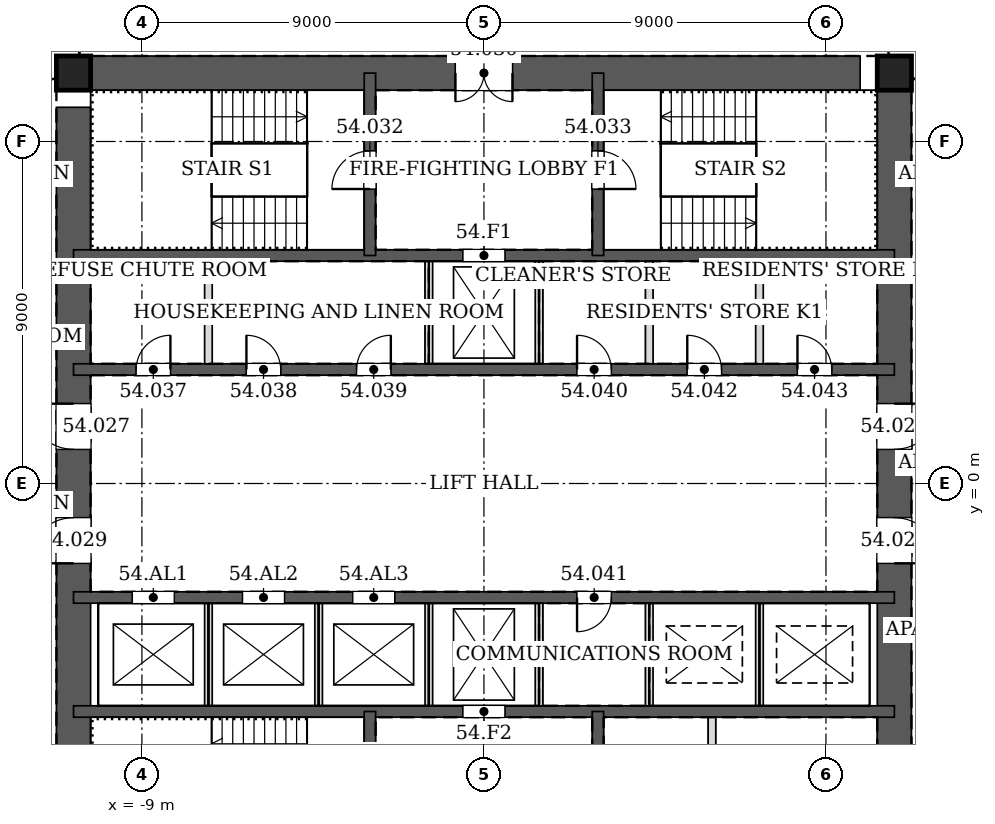
"""IFC4 building model, lengths in metres.
Left out: names, types, materials, properties, quantities, classifications, styles, units other than length and angle.
Written with IfcOpenShell. Run it as: python <this file> out.ifc"""

import sys

from ifc_helpers import new_model, si_unit, direction, frame, frame_2d, origin, origin_2d, place, context, subcontext, project, spatial, rectangle, hollow_rectangle, extrude, element, fill, save


model = new_model("IFC4")
c1 = context("Model", 3, precision=1e-05, world=origin(), true_north=direction((0.0, 1.0)))
c2 = subcontext(c1, "Body", "Model", "MODEL_VIEW")
j1 = project(units=[si_unit("LENGTHUNIT", "METRE"), si_unit("PLANEANGLEUNIT", "RADIAN")], contexts=[c1])
p1 = place(None, origin())
s1 = spatial("IfcSite", under=j1, at=p1, CompositionType="ELEMENT")
p2 = place(p1, origin())
s2 = spatial("IfcBuilding", under=s1, at=p2, CompositionType="ELEMENT")
p3 = place(p2, frame((0.0, 0.0, 231.2)))
s3 = spatial("IfcBuildingStorey", under=s2, at=p3, CompositionType="ELEMENT", Elevation=231.2)
for number, where, z_axis, x_axis in (
    (1, (10.8, 10.8, 0.0), (0.0, 0.0, 1.0), (1.0, 0.0, 0.0)),
    (2, (-10.8, 10.8, 0.0), (0.0, 0.0, 1.0), (1.0, 0.0, 0.0)),
):
    element("IfcColumn", number, at=place(p3, frame(where, z_axis=z_axis, x_axis=x_axis)), inside=s3, PredefinedType="COLUMN", context=c2, shape_type="SweptSolid", body=[
        extrude(hollow_rectangle(XDim=0.9, YDim=0.9, WallThickness=0.05, at=origin_2d()), origin(), (0.0, 0.0, 1.0), 3.4),
    ])
p4 = place(p3, frame((10.8, -10.8, 0.0), z_axis=(0.0, 0.0, 1.0), x_axis=(0.0, 1.0, 0.0)))
e3 = element("IfcWall", 3, at=p4, inside=s3, PredefinedType="SOLIDWALL", context=c2, shape_type="SweptSolid", body=[
    extrude(rectangle(XDim=21.6, YDim=0.9, at=frame_2d((10.8, 0.0))), origin(), (0.0, 0.0, 1.0), 3.4),
])
p5 = place(p4, frame((11.7, 0.0, 0.0)))
e4 = element("IfcOpeningElement", 4, at=p5, cuts=e3, PredefinedType="OPENING", context=c2, shape_type="SweptSolid", body=[
    extrude(rectangle(XDim=1.2, YDim=2.1, at=frame_2d((0.6, 1.05))), frame((0.0, 0.46, 0.0), z_axis=(0.0, -1.0, 0.0), x_axis=(1.0, 0.0, 0.0)), (0.0, 0.0, 1.0), 0.92),
])
p6 = place(p4, frame((8.7, 0.0, 0.0)))
e5 = element("IfcOpeningElement", 5, at=p6, cuts=e3, PredefinedType="OPENING", context=c2, shape_type="SweptSolid", body=[
    extrude(rectangle(XDim=1.2, YDim=2.1, at=frame_2d((0.6, 1.05))), frame((0.0, 0.46, 0.0), z_axis=(0.0, -1.0, 0.0), x_axis=(1.0, 0.0, 0.0)), (0.0, 0.0, 1.0), 0.92),
])
p7 = place(p3, frame((10.8, 10.8, 0.0), z_axis=(0.0, 0.0, 1.0), x_axis=(-1.0, 0.0, 0.0)))
e6 = element("IfcWall", 6, at=p7, inside=s3, PredefinedType="SOLIDWALL", context=c2, shape_type="SweptSolid", body=[
    extrude(rectangle(XDim=21.6, YDim=0.9, at=frame_2d((10.8, 0.0))), origin(), (0.0, 0.0, 1.0), 3.4),
])
p8 = place(p7, frame((10.05, 0.0, 0.0)))
e7 = element("IfcOpeningElement", 7, at=p8, cuts=e6, PredefinedType="OPENING", context=c2, shape_type="SweptSolid", body=[
    extrude(rectangle(XDim=1.5, YDim=2.1, at=frame_2d((0.75, 1.05))), frame((0.0, 0.46, 0.0), z_axis=(0.0, -1.0, 0.0), x_axis=(1.0, 0.0, 0.0)), (0.0, 0.0, 1.0), 0.92),
])
p9 = place(p3, frame((-10.8, 10.8, 0.0), z_axis=(0.0, 0.0, 1.0), x_axis=(0.0, -1.0, 0.0)))
e8 = element("IfcWall", 8, at=p9, inside=s3, PredefinedType="SOLIDWALL", context=c2, shape_type="SweptSolid", body=[
    extrude(rectangle(XDim=21.6, YDim=0.9, at=frame_2d((10.8, 0.0))), origin(), (0.0, 0.0, 1.0), 3.4),
])
p10 = place(p9, frame((8.7, 0.0, 0.0)))
e9 = element("IfcOpeningElement", 9, at=p10, cuts=e8, PredefinedType="OPENING", context=c2, shape_type="SweptSolid", body=[
    extrude(rectangle(XDim=1.2, YDim=2.1, at=frame_2d((0.6, 1.05))), frame((0.0, 0.46, 0.0), z_axis=(0.0, -1.0, 0.0), x_axis=(1.0, 0.0, 0.0)), (0.0, 0.0, 1.0), 0.92),
])
p11 = place(p9, frame((11.7, 0.0, 0.0)))
e10 = element("IfcOpeningElement", 10, at=p11, cuts=e8, PredefinedType="OPENING", context=c2, shape_type="SweptSolid", body=[
    extrude(rectangle(XDim=1.2, YDim=2.1, at=frame_2d((0.6, 1.05))), frame((0.0, 0.46, 0.0), z_axis=(0.0, -1.0, 0.0), x_axis=(1.0, 0.0, 0.0)), (0.0, 0.0, 1.0), 0.92),
])
p12 = place(p3, frame((-10.8, 3.0, 0.0), z_axis=(0.0, 0.0, 1.0), x_axis=(1.0, 0.0, 0.0)))
e11 = element("IfcWall", 11, at=p12, inside=s3, PredefinedType="SOLIDWALL", context=c2, shape_type="SweptSolid", body=[
    extrude(rectangle(XDim=21.6, YDim=0.3, at=frame_2d((10.8, 0.0))), origin(), (0.0, 0.0, 1.0), 3.4),
])
p13 = place(p12, frame((1.65, 0.0, 0.0)))
e12 = element("IfcOpeningElement", 12, at=p13, cuts=e11, PredefinedType="OPENING", context=c2, shape_type="SweptSolid", body=[
    extrude(rectangle(XDim=0.9, YDim=2.1, at=frame_2d((0.45, 1.05))), frame((0.0, 0.16, 0.0), z_axis=(0.0, -1.0, 0.0), x_axis=(1.0, 0.0, 0.0)), (0.0, 0.0, 1.0), 0.32),
])
p14 = place(p12, frame((4.55, 0.0, 0.0)))
e13 = element("IfcOpeningElement", 13, at=p14, cuts=e11, PredefinedType="OPENING", context=c2, shape_type="SweptSolid", body=[
    extrude(rectangle(XDim=0.9, YDim=2.1, at=frame_2d((0.45, 1.05))), frame((0.0, 0.16, 0.0), z_axis=(0.0, -1.0, 0.0), x_axis=(1.0, 0.0, 0.0)), (0.0, 0.0, 1.0), 0.32),
])
p15 = place(p12, frame((7.45, 0.0, 0.0)))
e14 = element("IfcOpeningElement", 14, at=p15, cuts=e11, PredefinedType="OPENING", context=c2, shape_type="SweptSolid", body=[
    extrude(rectangle(XDim=0.9, YDim=2.1, at=frame_2d((0.45, 1.05))), frame((0.0, 0.16, 0.0), z_axis=(0.0, -1.0, 0.0), x_axis=(1.0, 0.0, 0.0)), (0.0, 0.0, 1.0), 0.32),
])
p16 = place(p12, frame((13.25, 0.0, 0.0)))
e15 = element("IfcOpeningElement", 15, at=p16, cuts=e11, PredefinedType="OPENING", context=c2, shape_type="SweptSolid", body=[
    extrude(rectangle(XDim=0.9, YDim=2.1, at=frame_2d((0.45, 1.05))), frame((0.0, 0.16, 0.0), z_axis=(0.0, -1.0, 0.0), x_axis=(1.0, 0.0, 0.0)), (0.0, 0.0, 1.0), 0.32),
])
p17 = place(p12, frame((16.15, 0.0, 0.0)))
e16 = element("IfcOpeningElement", 16, at=p17, cuts=e11, PredefinedType="OPENING", context=c2, shape_type="SweptSolid", body=[
    extrude(rectangle(XDim=0.9, YDim=2.1, at=frame_2d((0.45, 1.05))), frame((0.0, 0.16, 0.0), z_axis=(0.0, -1.0, 0.0), x_axis=(1.0, 0.0, 0.0)), (0.0, 0.0, 1.0), 0.32),
])
p18 = place(p12, frame((19.05, 0.0, 0.0)))
e17 = element("IfcOpeningElement", 17, at=p18, cuts=e11, PredefinedType="OPENING", context=c2, shape_type="SweptSolid", body=[
    extrude(rectangle(XDim=0.9, YDim=2.1, at=frame_2d((0.45, 1.05))), frame((0.0, 0.16, 0.0), z_axis=(0.0, -1.0, 0.0), x_axis=(1.0, 0.0, 0.0)), (0.0, 0.0, 1.0), 0.32),
])
p19 = place(p3, frame((-10.8, 6.0, 0.0), z_axis=(0.0, 0.0, 1.0), x_axis=(1.0, 0.0, 0.0)))
e18 = element("IfcWall", 18, at=p19, inside=s3, PredefinedType="SOLIDWALL", context=c2, shape_type="SweptSolid", body=[
    extrude(rectangle(XDim=21.6, YDim=0.3, at=frame_2d((10.8, 0.0))), origin(), (0.0, 0.0, 1.0), 3.4),
])
p20 = place(p19, frame((10.25, 0.0, 0.0)))
e19 = element("IfcOpeningElement", 19, at=p20, cuts=e18, PredefinedType="OPENING", context=c2, shape_type="SweptSolid", body=[
    extrude(rectangle(XDim=1.1, YDim=2.1, at=frame_2d((0.55, 1.05))), frame((0.0, 0.16, 0.0), z_axis=(0.0, -1.0, 0.0), x_axis=(1.0, 0.0, 0.0)), (0.0, 0.0, 1.0), 0.32),
])
p21 = place(p3, frame((-3.0, 6.0, 0.0), z_axis=(0.0, 0.0, 1.0), x_axis=(0.0, 1.0, 0.0)))
e20 = element("IfcWall", 20, at=p21, inside=s3, PredefinedType="SOLIDWALL", context=c2, shape_type="SweptSolid", body=[
    extrude(rectangle(XDim=4.8, YDim=0.3, at=frame_2d((2.4, 0.0))), origin(), (0.0, 0.0, 1.0), 3.4),
])
p22 = place(p21, frame((1.75, 0.0, 0.0)))
e21 = element("IfcOpeningElement", 21, at=p22, cuts=e20, PredefinedType="OPENING", context=c2, shape_type="SweptSolid", body=[
    extrude(rectangle(XDim=1.0, YDim=2.1, at=frame_2d((0.5, 1.05))), frame((0.0, 0.16, 0.0), z_axis=(0.0, -1.0, 0.0), x_axis=(1.0, 0.0, 0.0)), (0.0, 0.0, 1.0), 0.32),
])
p23 = place(p3, frame((3.0, 6.0, 0.0), z_axis=(0.0, 0.0, 1.0), x_axis=(0.0, 1.0, 0.0)))
e22 = element("IfcWall", 22, at=p23, inside=s3, PredefinedType="SOLIDWALL", context=c2, shape_type="SweptSolid", body=[
    extrude(rectangle(XDim=4.8, YDim=0.3, at=frame_2d((2.4, 0.0))), origin(), (0.0, 0.0, 1.0), 3.4),
])
p24 = place(p23, frame((1.75, 0.0, 0.0)))
e23 = element("IfcOpeningElement", 23, at=p24, cuts=e22, PredefinedType="OPENING", context=c2, shape_type="SweptSolid", body=[
    extrude(rectangle(XDim=1.0, YDim=2.1, at=frame_2d((0.5, 1.05))), frame((0.0, 0.16, 0.0), z_axis=(0.0, -1.0, 0.0), x_axis=(1.0, 0.0, 0.0)), (0.0, 0.0, 1.0), 0.32),
])
p25 = place(p3, frame((-10.8, -3.0, 0.0), z_axis=(0.0, 0.0, 1.0), x_axis=(1.0, 0.0, 0.0)))
e24 = element("IfcWall", 24, at=p25, inside=s3, PredefinedType="SOLIDWALL", context=c2, shape_type="SweptSolid", body=[
    extrude(rectangle(XDim=21.6, YDim=0.3, at=frame_2d((10.8, 0.0))), origin(), (0.0, 0.0, 1.0), 3.4),
])
p26 = place(p25, frame((13.25, 0.0, 0.0)))
e25 = element("IfcOpeningElement", 25, at=p26, cuts=e24, PredefinedType="OPENING", context=c2, shape_type="SweptSolid", body=[
    extrude(rectangle(XDim=0.9, YDim=2.1, at=frame_2d((0.45, 1.05))), frame((0.0, 0.16, 0.0), z_axis=(0.0, -1.0, 0.0), x_axis=(1.0, 0.0, 0.0)), (0.0, 0.0, 1.0), 0.32),
])
p27 = place(p25, frame((1.55, 0.0, 0.0)))
e26 = element("IfcOpeningElement", 26, at=p27, cuts=e24, PredefinedType="OPENING", context=c2, shape_type="SweptSolid", body=[
    extrude(rectangle(XDim=1.1, YDim=2.1, at=frame_2d((0.55, 1.05))), frame((0.0, 0.16, 0.0), z_axis=(0.0, -1.0, 0.0), x_axis=(1.0, 0.0, 0.0)), (0.0, 0.0, 1.0), 0.32),
])
p28 = place(p25, frame((4.45, 0.0, 0.0)))
e27 = element("IfcOpeningElement", 27, at=p28, cuts=e24, PredefinedType="OPENING", context=c2, shape_type="SweptSolid", body=[
    extrude(rectangle(XDim=1.1, YDim=2.1, at=frame_2d((0.55, 1.05))), frame((0.0, 0.16, 0.0), z_axis=(0.0, -1.0, 0.0), x_axis=(1.0, 0.0, 0.0)), (0.0, 0.0, 1.0), 0.32),
])
p29 = place(p25, frame((7.35, 0.0, 0.0)))
e28 = element("IfcOpeningElement", 28, at=p29, cuts=e24, PredefinedType="OPENING", context=c2, shape_type="SweptSolid", body=[
    extrude(rectangle(XDim=1.1, YDim=2.1, at=frame_2d((0.55, 1.05))), frame((0.0, 0.16, 0.0), z_axis=(0.0, -1.0, 0.0), x_axis=(1.0, 0.0, 0.0)), (0.0, 0.0, 1.0), 0.32),
])
p30 = place(p3, frame((-10.8, -6.0, 0.0), z_axis=(0.0, 0.0, 1.0), x_axis=(1.0, 0.0, 0.0)))
e29 = element("IfcWall", 29, at=p30, inside=s3, PredefinedType="SOLIDWALL", context=c2, shape_type="SweptSolid", body=[
    extrude(rectangle(XDim=21.6, YDim=0.3, at=frame_2d((10.8, 0.0))), origin(), (0.0, 0.0, 1.0), 3.4),
])
p31 = place(p30, frame((10.25, 0.0, 0.0)))
e30 = element("IfcOpeningElement", 30, at=p31, cuts=e29, PredefinedType="OPENING", context=c2, shape_type="SweptSolid", body=[
    extrude(rectangle(XDim=1.1, YDim=2.1, at=frame_2d((0.55, 1.05))), frame((0.0, 0.16, 0.0), z_axis=(0.0, -1.0, 0.0), x_axis=(1.0, 0.0, 0.0)), (0.0, 0.0, 1.0), 0.32),
])
p32 = place(p3, frame((-3.0, -6.0, 0.0), z_axis=(0.0, 0.0, 1.0), x_axis=(0.0, -1.0, 0.0)))
e31 = element("IfcWall", 31, at=p32, inside=s3, PredefinedType="SOLIDWALL", context=c2, shape_type="SweptSolid", body=[
    extrude(rectangle(XDim=4.8, YDim=0.3, at=frame_2d((2.4, 0.0))), origin(), (0.0, 0.0, 1.0), 3.4),
])
p33 = place(p32, frame((1.75, 0.0, 0.0)))
e32 = element("IfcOpeningElement", 32, at=p33, cuts=e31, PredefinedType="OPENING", context=c2, shape_type="SweptSolid", body=[
    extrude(rectangle(XDim=1.0, YDim=2.1, at=frame_2d((0.5, 1.05))), frame((0.0, 0.16, 0.0), z_axis=(0.0, -1.0, 0.0), x_axis=(1.0, 0.0, 0.0)), (0.0, 0.0, 1.0), 0.32),
])
p34 = place(p3, frame((3.0, -6.0, 0.0), z_axis=(0.0, 0.0, 1.0), x_axis=(0.0, -1.0, 0.0)))
e33 = element("IfcWall", 33, at=p34, inside=s3, PredefinedType="SOLIDWALL", context=c2, shape_type="SweptSolid", body=[
    extrude(rectangle(XDim=4.8, YDim=0.3, at=frame_2d((2.4, 0.0))), origin(), (0.0, 0.0, 1.0), 3.4),
])
for number, where, z_axis, x_axis in (
    (34, (-7.25, 3.15, 0.0), (0.0, 0.0, 1.0), (0.0, 1.0, 0.0)),
    (35, (-1.45, 3.15, 0.0), (0.0, 0.0, 1.0), (0.0, 1.0, 0.0)),
    (36, (1.45, 3.15, 0.0), (0.0, 0.0, 1.0), (0.0, 1.0, 0.0)),
    (37, (4.35, 3.15, 0.0), (0.0, 0.0, 1.0), (0.0, 1.0, 0.0)),
    (38, (7.25, 3.15, 0.0), (0.0, 0.0, 1.0), (0.0, 1.0, 0.0)),
):
    element("IfcWall", number, at=place(p3, frame(where, z_axis=z_axis, x_axis=x_axis)), inside=s3, PredefinedType="PARTITIONING", context=c2, shape_type="SweptSolid", body=[
        extrude(rectangle(XDim=2.7, YDim=0.2, at=frame_2d((1.35, 0.0))), origin(), (0.0, 0.0, 1.0), 3.2),
    ])
for number, where, z_axis, x_axis in (
    (39, (-7.25, -5.85, 0.0), (0.0, 0.0, 1.0), (0.0, 1.0, 0.0)),
    (40, (-4.35, -5.85, 0.0), (0.0, 0.0, 1.0), (0.0, 1.0, 0.0)),
    (41, (-1.45, -5.85, 0.0), (0.0, 0.0, 1.0), (0.0, 1.0, 0.0)),
):
    element("IfcWall", number, at=place(p3, frame(where, z_axis=z_axis, x_axis=x_axis)), inside=s3, PredefinedType="PARTITIONING", context=c2, shape_type="SweptSolid", body=[
        extrude(rectangle(XDim=2.7, YDim=0.2, at=frame_2d((1.35, 0.0))), origin(), (0.0, 0.0, 1.0), 3.4),
    ])
for number, where, z_axis, x_axis in (
    (42, (1.45, -5.85, 0.0), (0.0, 0.0, 1.0), (0.0, 1.0, 0.0)),
    (43, (4.35, -5.85, 0.0), (0.0, 0.0, 1.0), (0.0, 1.0, 0.0)),
):
    element("IfcWall", number, at=place(p3, frame(where, z_axis=z_axis, x_axis=x_axis)), inside=s3, PredefinedType="PARTITIONING", context=c2, shape_type="SweptSolid", body=[
        extrude(rectangle(XDim=2.7, YDim=0.2, at=frame_2d((1.35, 0.0))), origin(), (0.0, 0.0, 1.0), 3.2),
    ])
p35 = place(p3, frame((7.25, -5.85, 0.0), z_axis=(0.0, 0.0, 1.0), x_axis=(0.0, 1.0, 0.0)))
e44 = element("IfcWall", 44, at=p35, inside=s3, PredefinedType="PARTITIONING", context=c2, shape_type="SweptSolid", body=[
    extrude(rectangle(XDim=2.7, YDim=0.2, at=frame_2d((1.35, 0.0))), origin(), (0.0, 0.0, 1.0), 3.4),
])
p36 = place(p3, frame((6.0, -10.35, 0.0), z_axis=(0.0, 0.0, 1.0), x_axis=(0.0, 1.0, 0.0)))
e45 = element("IfcWall", 45, at=p36, inside=s3, PredefinedType="PARTITIONING", context=c2, shape_type="SweptSolid", body=[
    extrude(rectangle(XDim=4.2, YDim=0.2, at=frame_2d((2.1, 0.0))), origin(), (0.0, 0.0, 1.0), 3.2),
])
p37 = place(p36, frame((0.3, 0.0, 0.0)))
e46 = element("IfcOpeningElement", 46, at=p37, cuts=e45, PredefinedType="OPENING", context=c2, shape_type="SweptSolid", body=[
    extrude(rectangle(XDim=0.9, YDim=2.1, at=frame_2d((0.45, 1.05))), frame((0.0, 0.11, 0.0), z_axis=(0.0, -1.0, 0.0), x_axis=(1.0, 0.0, 0.0)), (0.0, 0.0, 1.0), 0.22),
])
p38 = place(p5, frame((1.2, 0.0, 0.0), z_axis=(0.0, 0.0, 1.0), x_axis=(-1.0, 0.0, 0.0)))
e47 = element("IfcDoor", 47, at=p38, inside=s3, OperationType="SINGLE_SWING_LEFT", PredefinedType="DOOR", context=c2, shape_type="SweptSolid", body=[
    extrude(rectangle(XDim=1.2, YDim=2.1, at=frame_2d((0.6, 1.05))), frame((0.0, 0.025, 0.0), z_axis=(0.0, -1.0, 0.0), x_axis=(1.0, 0.0, 0.0)), (0.0, 0.0, 1.0), 0.05),
])
fill(e4, e47)
p39 = place(p10, frame((1.2, 0.0, 0.0), z_axis=(0.0, 0.0, 1.0), x_axis=(-1.0, 0.0, 0.0)))
e48 = element("IfcDoor", 48, at=p39, inside=s3, OperationType="SINGLE_SWING_RIGHT", PredefinedType="DOOR", context=c2, shape_type="SweptSolid", body=[
    extrude(rectangle(XDim=1.2, YDim=2.1, at=frame_2d((0.6, 1.05))), frame((0.0, 0.025, 0.0), z_axis=(0.0, -1.0, 0.0), x_axis=(1.0, 0.0, 0.0)), (0.0, 0.0, 1.0), 0.05),
])
fill(e9, e48)
p40 = place(p6, frame((1.2, 0.0, 0.0), z_axis=(0.0, 0.0, 1.0), x_axis=(-1.0, 0.0, 0.0)))
e49 = element("IfcDoor", 49, at=p40, inside=s3, OperationType="SINGLE_SWING_RIGHT", PredefinedType="DOOR", context=c2, shape_type="SweptSolid", body=[
    extrude(rectangle(XDim=1.2, YDim=2.1, at=frame_2d((0.6, 1.05))), frame((0.0, 0.025, 0.0), z_axis=(0.0, -1.0, 0.0), x_axis=(1.0, 0.0, 0.0)), (0.0, 0.0, 1.0), 0.05),
])
fill(e5, e49)
p41 = place(p11, frame((1.2, 0.0, 0.0), z_axis=(0.0, 0.0, 1.0), x_axis=(-1.0, 0.0, 0.0)))
e50 = element("IfcDoor", 50, at=p41, inside=s3, OperationType="SINGLE_SWING_LEFT", PredefinedType="DOOR", context=c2, shape_type="SweptSolid", body=[
    extrude(rectangle(XDim=1.2, YDim=2.1, at=frame_2d((0.6, 1.05))), frame((0.0, 0.025, 0.0), z_axis=(0.0, -1.0, 0.0), x_axis=(1.0, 0.0, 0.0)), (0.0, 0.0, 1.0), 0.05),
])
fill(e10, e50)
p42 = place(p8, origin())
e51 = element("IfcDoor", 51, at=p42, inside=s3, OperationType="DOUBLE_DOOR_SINGLE_SWING", PredefinedType="DOOR", context=c2, shape_type="SweptSolid", body=[
    extrude(rectangle(XDim=1.5, YDim=2.1, at=frame_2d((0.75, 1.05))), frame((0.0, 0.025, 0.0), z_axis=(0.0, -1.0, 0.0), x_axis=(1.0, 0.0, 0.0)), (0.0, 0.0, 1.0), 0.05),
])
fill(e7, e51)
p43 = place(p22, origin())
e52 = element("IfcDoor", 52, at=p43, inside=s3, OperationType="SINGLE_SWING_LEFT", PredefinedType="DOOR", context=c2, shape_type="SweptSolid", body=[
    extrude(rectangle(XDim=1.0, YDim=2.1, at=frame_2d((0.5, 1.05))), frame((0.0, 0.025, 0.0), z_axis=(0.0, -1.0, 0.0), x_axis=(1.0, 0.0, 0.0)), (0.0, 0.0, 1.0), 0.05),
])
fill(e21, e52)
p44 = place(p24, frame((1.0, 0.0, 0.0), z_axis=(0.0, 0.0, 1.0), x_axis=(-1.0, 0.0, 0.0)))
e53 = element("IfcDoor", 53, at=p44, inside=s3, OperationType="SINGLE_SWING_RIGHT", PredefinedType="DOOR", context=c2, shape_type="SweptSolid", body=[
    extrude(rectangle(XDim=1.0, YDim=2.1, at=frame_2d((0.5, 1.05))), frame((0.0, 0.025, 0.0), z_axis=(0.0, -1.0, 0.0), x_axis=(1.0, 0.0, 0.0)), (0.0, 0.0, 1.0), 0.05),
])
fill(e23, e53)
p45 = place(p13, origin())
e54 = element("IfcDoor", 54, at=p45, inside=s3, OperationType="SINGLE_SWING_RIGHT", PredefinedType="DOOR", context=c2, shape_type="SweptSolid", body=[
    extrude(rectangle(XDim=0.9, YDim=2.1, at=frame_2d((0.45, 1.05))), frame((0.0, 0.025, 0.0), z_axis=(0.0, -1.0, 0.0), x_axis=(1.0, 0.0, 0.0)), (0.0, 0.0, 1.0), 0.05),
])
fill(e12, e54)
p46 = place(p14, origin())
e55 = element("IfcDoor", 55, at=p46, inside=s3, OperationType="SINGLE_SWING_LEFT", PredefinedType="DOOR", context=c2, shape_type="SweptSolid", body=[
    extrude(rectangle(XDim=0.9, YDim=2.1, at=frame_2d((0.45, 1.05))), frame((0.0, 0.025, 0.0), z_axis=(0.0, -1.0, 0.0), x_axis=(1.0, 0.0, 0.0)), (0.0, 0.0, 1.0), 0.05),
])
fill(e13, e55)
p47 = place(p15, origin())
e56 = element("IfcDoor", 56, at=p47, inside=s3, OperationType="SINGLE_SWING_RIGHT", PredefinedType="DOOR", context=c2, shape_type="SweptSolid", body=[
    extrude(rectangle(XDim=0.9, YDim=2.1, at=frame_2d((0.45, 1.05))), frame((0.0, 0.025, 0.0), z_axis=(0.0, -1.0, 0.0), x_axis=(1.0, 0.0, 0.0)), (0.0, 0.0, 1.0), 0.05),
])
fill(e14, e56)
p48 = place(p16, origin())
e57 = element("IfcDoor", 57, at=p48, inside=s3, OperationType="SINGLE_SWING_LEFT", PredefinedType="DOOR", context=c2, shape_type="SweptSolid", body=[
    extrude(rectangle(XDim=0.9, YDim=2.1, at=frame_2d((0.45, 1.05))), frame((0.0, 0.025, 0.0), z_axis=(0.0, -1.0, 0.0), x_axis=(1.0, 0.0, 0.0)), (0.0, 0.0, 1.0), 0.05),
])
fill(e15, e57)
p49 = place(p26, frame((0.9, 0.0, 0.0), z_axis=(0.0, 0.0, 1.0), x_axis=(-1.0, 0.0, 0.0)))
e58 = element("IfcDoor", 58, at=p49, inside=s3, OperationType="SINGLE_SWING_RIGHT", PredefinedType="DOOR", context=c2, shape_type="SweptSolid", body=[
    extrude(rectangle(XDim=0.9, YDim=2.1, at=frame_2d((0.45, 1.05))), frame((0.0, 0.025, 0.0), z_axis=(0.0, -1.0, 0.0), x_axis=(1.0, 0.0, 0.0)), (0.0, 0.0, 1.0), 0.05),
])
fill(e25, e58)
p50 = place(p17, origin())
e59 = element("IfcDoor", 59, at=p50, inside=s3, OperationType="SINGLE_SWING_LEFT", PredefinedType="DOOR", context=c2, shape_type="SweptSolid", body=[
    extrude(rectangle(XDim=0.9, YDim=2.1, at=frame_2d((0.45, 1.05))), frame((0.0, 0.025, 0.0), z_axis=(0.0, -1.0, 0.0), x_axis=(1.0, 0.0, 0.0)), (0.0, 0.0, 1.0), 0.05),
])
fill(e16, e59)
p51 = place(p18, origin())
e60 = element("IfcDoor", 60, at=p51, inside=s3, OperationType="SINGLE_SWING_LEFT", PredefinedType="DOOR", context=c2, shape_type="SweptSolid", body=[
    extrude(rectangle(XDim=0.9, YDim=2.1, at=frame_2d((0.45, 1.05))), frame((0.0, 0.025, 0.0), z_axis=(0.0, -1.0, 0.0), x_axis=(1.0, 0.0, 0.0)), (0.0, 0.0, 1.0), 0.05),
])
fill(e17, e60)
p52 = place(p20, origin())
e61 = element("IfcDoor", 61, at=p52, inside=s3, OperationType="DOUBLE_DOOR_SLIDING", PredefinedType="DOOR", context=c2, shape_type="SweptSolid", body=[
    extrude(rectangle(XDim=1.1, YDim=2.1, at=frame_2d((0.55, 1.05))), frame((0.0, 0.025, 0.0), z_axis=(0.0, -1.0, 0.0), x_axis=(1.0, 0.0, 0.0)), (0.0, 0.0, 1.0), 0.05),
])
fill(e19, e61)
p53 = place(p31, origin())
e62 = element("IfcDoor", 62, at=p53, inside=s3, OperationType="DOUBLE_DOOR_SLIDING", PredefinedType="DOOR", context=c2, shape_type="SweptSolid", body=[
    extrude(rectangle(XDim=1.1, YDim=2.1, at=frame_2d((0.55, 1.05))), frame((0.0, 0.025, 0.0), z_axis=(0.0, -1.0, 0.0), x_axis=(1.0, 0.0, 0.0)), (0.0, 0.0, 1.0), 0.05),
])
fill(e30, e62)
p54 = place(p27, origin())
e63 = element("IfcDoor", 63, at=p54, inside=s3, OperationType="DOUBLE_DOOR_SLIDING", PredefinedType="DOOR", context=c2, shape_type="SweptSolid", body=[
    extrude(rectangle(XDim=1.1, YDim=2.1, at=frame_2d((0.55, 1.05))), frame((0.0, 0.025, 0.0), z_axis=(0.0, -1.0, 0.0), x_axis=(1.0, 0.0, 0.0)), (0.0, 0.0, 1.0), 0.05),
])
fill(e26, e63)
p55 = place(p28, origin())
e64 = element("IfcDoor", 64, at=p55, inside=s3, OperationType="DOUBLE_DOOR_SLIDING", PredefinedType="DOOR", context=c2, shape_type="SweptSolid", body=[
    extrude(rectangle(XDim=1.1, YDim=2.1, at=frame_2d((0.55, 1.05))), frame((0.0, 0.025, 0.0), z_axis=(0.0, -1.0, 0.0), x_axis=(1.0, 0.0, 0.0)), (0.0, 0.0, 1.0), 0.05),
])
fill(e27, e64)
p56 = place(p29, origin())
e65 = element("IfcDoor", 65, at=p56, inside=s3, OperationType="DOUBLE_DOOR_SLIDING", PredefinedType="DOOR", context=c2, shape_type="SweptSolid", body=[
    extrude(rectangle(XDim=1.1, YDim=2.1, at=frame_2d((0.55, 1.05))), frame((0.0, 0.025, 0.0), z_axis=(0.0, -1.0, 0.0), x_axis=(1.0, 0.0, 0.0)), (0.0, 0.0, 1.0), 0.05),
])
fill(e28, e65)
save(model, sys.argv[1])
